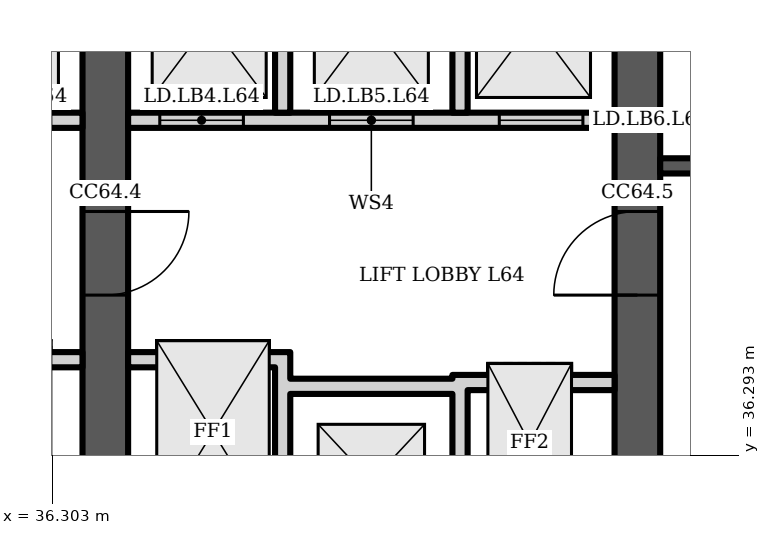
"""IFC4 building model, lengths in metres.
Left out: names, types, materials, properties, quantities, classifications, styles, units other than length and angle.
Written with IfcOpenShell. Run it as: python <this file> out.ifc"""

import sys

from ifc_helpers import new_model, si_unit, direction, frame, frame_2d, origin, place, context, subcontext, project, spatial, polyline, rectangle, outline, extrude, element, fill, save


model = new_model("IFC4")
c1 = context("Model", 3, precision=1e-05, world=origin(), true_north=direction((0.0, 1.0)))
c2 = subcontext(c1, "Body", "Model", "MODEL_VIEW")
j1 = project(units=[si_unit("LENGTHUNIT", "METRE"), si_unit("PLANEANGLEUNIT", "RADIAN")], contexts=[c1])
p1 = place(None, origin())
s1 = spatial("IfcSite", under=j1, at=p1, CompositionType="ELEMENT")
p2 = place(p1, origin())
s2 = spatial("IfcBuilding", under=s1, at=p2, CompositionType="ELEMENT")
p3 = place(p2, frame((0.0, 0.0, 253.9)))
s3 = spatial("IfcBuildingStorey", under=s2, at=p3, CompositionType="ELEMENT", Elevation=253.9)
p4 = place(p3, frame((37.0, 34.6, 0.0), z_axis=(0.0, 0.0, 1.0), x_axis=(0.0, 1.0, 0.0)))
e1 = element("IfcWall", 1, at=p4, inside=s3, PredefinedType="SHEAR", context=c2, shape_type="SweptSolid", body=[
    extrude(rectangle(XDim=14.784, YDim=0.6, at=frame_2d((7.392, 0.0))), origin(), (0.0, 0.0, 1.0), 3.6),
])
p5 = place(p4, frame((11.302, 0.0, 0.0)))
e2 = element("IfcOpeningElement", 2, at=p5, cuts=e1, PredefinedType="OPENING", context=c2, shape_type="SweptSolid", body=[
    extrude(rectangle(XDim=1.0, YDim=2.1, at=frame_2d((0.5, 1.05))), frame((0.0, 0.31, 0.0), z_axis=(0.0, -1.0, 0.0), x_axis=(1.0, 0.0, 0.0)), (0.0, 0.0, 1.0), 0.62),
])
p6 = place(p4, frame((3.8, 0.0, 0.0)))
e3 = element("IfcOpeningElement", 3, at=p6, cuts=e1, PredefinedType="OPENING", context=c2, shape_type="SweptSolid", body=[
    extrude(rectangle(XDim=1.1, YDim=2.1, at=frame_2d((0.55, 1.05))), frame((0.0, 0.31, 0.0), z_axis=(0.0, -1.0, 0.0), x_axis=(1.0, 0.0, 0.0)), (0.0, 0.0, 1.0), 0.62),
])
p7 = place(p3, frame((44.0, 34.6, 0.0), z_axis=(0.0, 0.0, 1.0), x_axis=(0.0, 1.0, 0.0)))
e4 = element("IfcWall", 4, at=p7, inside=s3, PredefinedType="SHEAR", context=c2, shape_type="SweptSolid", body=[
    extrude(rectangle(XDim=14.784, YDim=0.6, at=frame_2d((7.392, 0.0))), origin(), (0.0, 0.0, 1.0), 3.6),
])
p8 = place(p7, frame((11.608, 0.0, 0.0)))
e5 = element("IfcOpeningElement", 5, at=p8, cuts=e4, PredefinedType="OPENING", context=c2, shape_type="SweptSolid", body=[
    extrude(rectangle(XDim=1.0, YDim=2.1, at=frame_2d((0.5, 1.05))), frame((0.0, 0.31, 0.0), z_axis=(0.0, -1.0, 0.0), x_axis=(1.0, 0.0, 0.0)), (0.0, 0.0, 1.0), 0.62),
])
p9 = place(p7, frame((3.8, 0.0, 0.0)))
e6 = element("IfcOpeningElement", 6, at=p9, cuts=e4, PredefinedType="OPENING", context=c2, shape_type="SweptSolid", body=[
    extrude(rectangle(XDim=1.1, YDim=2.1, at=frame_2d((0.55, 1.05))), frame((0.0, 0.31, 0.0), z_axis=(0.0, -1.0, 0.0), x_axis=(1.0, 0.0, 0.0)), (0.0, 0.0, 1.0), 0.62),
])
p10 = place(p3, frame((30.3, 40.7, 0.0), z_axis=(0.0, 0.0, 1.0), x_axis=(1.0, 0.0, 0.0)))
e7 = element("IfcWall", 7, at=p10, inside=s3, PredefinedType="PARTITIONING", context=c2, shape_type="SweptSolid", body=[
    extrude(rectangle(XDim=6.4, YDim=0.2, at=frame_2d((3.2, 0.0))), origin(), (0.0, 0.0, 1.0), 3.2),
])
p11 = place(p10, frame((0.417, 0.0, 0.0)))
e8 = element("IfcOpeningElement", 8, at=p11, cuts=e7, PredefinedType="OPENING", context=c2, shape_type="SweptSolid", body=[
    extrude(rectangle(XDim=1.1, YDim=2.1, at=frame_2d((0.55, 1.05))), frame((0.0, 0.11, 0.0), z_axis=(0.0, -1.0, 0.0), x_axis=(1.0, 0.0, 0.0)), (0.0, 0.0, 1.0), 0.22),
])
p12 = place(p10, frame((2.65, 0.0, 0.0)))
e9 = element("IfcOpeningElement", 9, at=p12, cuts=e7, PredefinedType="OPENING", context=c2, shape_type="SweptSolid", body=[
    extrude(rectangle(XDim=1.1, YDim=2.1, at=frame_2d((0.55, 1.05))), frame((0.0, 0.11, 0.0), z_axis=(0.0, -1.0, 0.0), x_axis=(1.0, 0.0, 0.0)), (0.0, 0.0, 1.0), 0.22),
])
p13 = place(p10, frame((4.883, 0.0, 0.0)))
e10 = element("IfcOpeningElement", 10, at=p13, cuts=e7, PredefinedType="OPENING", context=c2, shape_type="SweptSolid", body=[
    extrude(rectangle(XDim=1.1, YDim=2.1, at=frame_2d((0.55, 1.05))), frame((0.0, 0.11, 0.0), z_axis=(0.0, -1.0, 0.0), x_axis=(1.0, 0.0, 0.0)), (0.0, 0.0, 1.0), 0.22),
])
p14 = place(p3, origin())
e11 = element("IfcWall", 11, at=p14, inside=s3, PredefinedType="PARTITIONING", context=c2, shape_type="SweptSolid", body=[
    extrude(outline(polyline([(34.567, 37.65), (34.767, 37.65), (36.7, 37.65), (36.7, 37.45), (34.767, 37.45), (34.767, 34.6), (34.567, 34.6), (34.567, 37.65)])), origin(), (0.0, 0.0, 1.0), 3.2),
])
p15 = place(p3, origin())
e12 = element("IfcWall", 12, at=p15, inside=s3, PredefinedType="PARTITIONING", context=c2, shape_type="SweptSolid", body=[
    extrude(outline(polyline([(32.433, 40.8), (32.233, 40.8), (32.233, 43.8), (30.3, 43.8), (30.3, 44.0), (36.7, 44.0), (36.7, 43.8), (34.767, 43.8), (34.767, 40.8), (34.567, 40.8), (34.567, 43.8), (32.433, 43.8), (32.433, 40.8)])), origin(), (0.0, 0.0, 1.0), 3.2),
])
p16 = place(p3, frame((37.3, 40.7, 0.0), z_axis=(0.0, 0.0, 1.0), x_axis=(1.0, 0.0, 0.0)))
e13 = element("IfcWall", 13, at=p16, inside=s3, PredefinedType="PARTITIONING", context=c2, shape_type="SweptSolid", body=[
    extrude(rectangle(XDim=6.4, YDim=0.2, at=frame_2d((3.2, 0.0))), origin(), (0.0, 0.0, 1.0), 3.2),
])
p17 = place(p16, frame((0.417, 0.0, 0.0)))
e14 = element("IfcOpeningElement", 14, at=p17, cuts=e13, PredefinedType="OPENING", context=c2, shape_type="SweptSolid", body=[
    extrude(rectangle(XDim=1.1, YDim=2.1, at=frame_2d((0.55, 1.05))), frame((0.0, 0.11, 0.0), z_axis=(0.0, -1.0, 0.0), x_axis=(1.0, 0.0, 0.0)), (0.0, 0.0, 1.0), 0.22),
])
p18 = place(p16, frame((2.65, 0.0, 0.0)))
e15 = element("IfcOpeningElement", 15, at=p18, cuts=e13, PredefinedType="OPENING", context=c2, shape_type="SweptSolid", body=[
    extrude(rectangle(XDim=1.1, YDim=2.1, at=frame_2d((0.55, 1.05))), frame((0.0, 0.11, 0.0), z_axis=(0.0, -1.0, 0.0), x_axis=(1.0, 0.0, 0.0)), (0.0, 0.0, 1.0), 0.22),
])
p19 = place(p16, frame((4.883, 0.0, 0.0)))
e16 = element("IfcOpeningElement", 16, at=p19, cuts=e13, PredefinedType="OPENING", context=c2, shape_type="SweptSolid", body=[
    extrude(rectangle(XDim=1.1, YDim=2.1, at=frame_2d((0.55, 1.05))), frame((0.0, 0.11, 0.0), z_axis=(0.0, -1.0, 0.0), x_axis=(1.0, 0.0, 0.0)), (0.0, 0.0, 1.0), 0.22),
])
p20 = place(p3, origin())
e17 = element("IfcWall", 17, at=p20, inside=s3, PredefinedType="PARTITIONING", context=c2, shape_type="SweptSolid", body=[
    extrude(outline(polyline([(41.567, 37.1), (39.433, 37.1), (39.433, 34.6), (39.233, 34.6), (39.233, 37.45), (37.3, 37.45), (37.3, 37.65), (39.233, 37.65), (39.433, 37.65), (39.433, 37.3), (41.567, 37.3), (41.567, 37.35), (41.767, 37.35), (43.7, 37.35), (43.7, 37.15), (41.767, 37.15), (41.767, 34.6), (41.567, 34.6), (41.567, 37.1)])), origin(), (0.0, 0.0, 1.0), 3.2),
])
p21 = place(p3, origin())
e18 = element("IfcWall", 18, at=p21, inside=s3, PredefinedType="PARTITIONING", context=c2, shape_type="SweptSolid", body=[
    extrude(outline(polyline([(39.433, 40.8), (39.233, 40.8), (39.233, 43.8), (37.3, 43.8), (37.3, 44.0), (43.7, 44.0), (43.7, 43.8), (41.767, 43.8), (41.767, 40.8), (41.567, 40.8), (41.567, 43.8), (39.433, 43.8), (39.433, 40.8)])), origin(), (0.0, 0.0, 1.0), 3.2),
])
p22 = place(p3, frame((44.3, 40.1, 0.0), z_axis=(0.0, 0.0, 1.0), x_axis=(1.0, 0.0, 0.0)))
e19 = element("IfcWall", 19, at=p22, inside=s3, PredefinedType="SHEAR", context=c2, shape_type="SweptSolid", body=[
    extrude(rectangle(XDim=6.4, YDim=0.2, at=frame_2d((3.2, 0.0))), origin(), (0.0, 0.0, 1.0), 3.2),
])
p23 = place(p22, frame((3.625, 0.0, 0.0)))
e20 = element("IfcOpeningElement", 20, at=p23, cuts=e19, PredefinedType="OPENING", context=c2, shape_type="SweptSolid", body=[
    extrude(rectangle(XDim=1.2, YDim=2.1, at=frame_2d((0.6, 1.05))), frame((0.0, 0.11, 0.0), z_axis=(0.0, -1.0, 0.0), x_axis=(1.0, 0.0, 0.0)), (0.0, 0.0, 1.0), 0.22),
])
p24 = place(p22, frame((0.625, 0.0, 0.0)))
e21 = element("IfcOpeningElement", 21, at=p24, cuts=e19, PredefinedType="OPENING", context=c2, shape_type="SweptSolid", body=[
    extrude(rectangle(XDim=0.9, YDim=2.1, at=frame_2d((0.45, 1.05))), frame((0.0, 0.11, 0.0), z_axis=(0.0, -1.0, 0.0), x_axis=(1.0, 0.0, 0.0)), (0.0, 0.0, 1.0), 0.22),
])
p25 = place(p17, origin())
e22 = element("IfcDoor", 22, at=p25, inside=s3, OperationType="DOUBLE_DOOR_SLIDING", PredefinedType="DOOR", context=c2, shape_type="SweptSolid", body=[
    extrude(rectangle(XDim=1.1, YDim=2.1, at=frame_2d((0.55, 1.05))), frame((0.0, 0.025, 0.0), z_axis=(0.0, -1.0, 0.0), x_axis=(1.0, 0.0, 0.0)), (0.0, 0.0, 1.0), 0.05),
])
fill(e14, e22)
p26 = place(p18, origin())
e23 = element("IfcDoor", 23, at=p26, inside=s3, OperationType="DOUBLE_DOOR_SLIDING", PredefinedType="DOOR", context=c2, shape_type="SweptSolid", body=[
    extrude(rectangle(XDim=1.1, YDim=2.1, at=frame_2d((0.55, 1.05))), frame((0.0, 0.025, 0.0), z_axis=(0.0, -1.0, 0.0), x_axis=(1.0, 0.0, 0.0)), (0.0, 0.0, 1.0), 0.05),
])
fill(e15, e23)
p27 = place(p19, origin())
e24 = element("IfcDoor", 24, at=p27, inside=s3, OperationType="DOUBLE_DOOR_SLIDING", PredefinedType="DOOR", context=c2, shape_type="SweptSolid", body=[
    extrude(rectangle(XDim=1.1, YDim=2.1, at=frame_2d((0.55, 1.05))), frame((0.0, 0.025, 0.0), z_axis=(0.0, -1.0, 0.0), x_axis=(1.0, 0.0, 0.0)), (0.0, 0.0, 1.0), 0.05),
])
fill(e16, e24)
p28 = place(p6, origin())
e25 = element("IfcDoor", 25, at=p28, inside=s3, OperationType="SINGLE_SWING_RIGHT", PredefinedType="DOOR", context=c2, shape_type="SweptSolid", body=[
    extrude(rectangle(XDim=1.1, YDim=2.1, at=frame_2d((0.55, 1.05))), frame((0.0, 0.025, 0.0), z_axis=(0.0, -1.0, 0.0), x_axis=(1.0, 0.0, 0.0)), (0.0, 0.0, 1.0), 0.05),
])
fill(e3, e25)
p29 = place(p9, origin())
e26 = element("IfcDoor", 26, at=p29, inside=s3, OperationType="SINGLE_SWING_LEFT", PredefinedType="DOOR", context=c2, shape_type="SweptSolid", body=[
    extrude(rectangle(XDim=1.1, YDim=2.1, at=frame_2d((0.55, 1.05))), frame((0.0, 0.025, 0.0), z_axis=(0.0, -1.0, 0.0), x_axis=(1.0, 0.0, 0.0)), (0.0, 0.0, 1.0), 0.05),
])
fill(e6, e26)
save(model, sys.argv[1])
